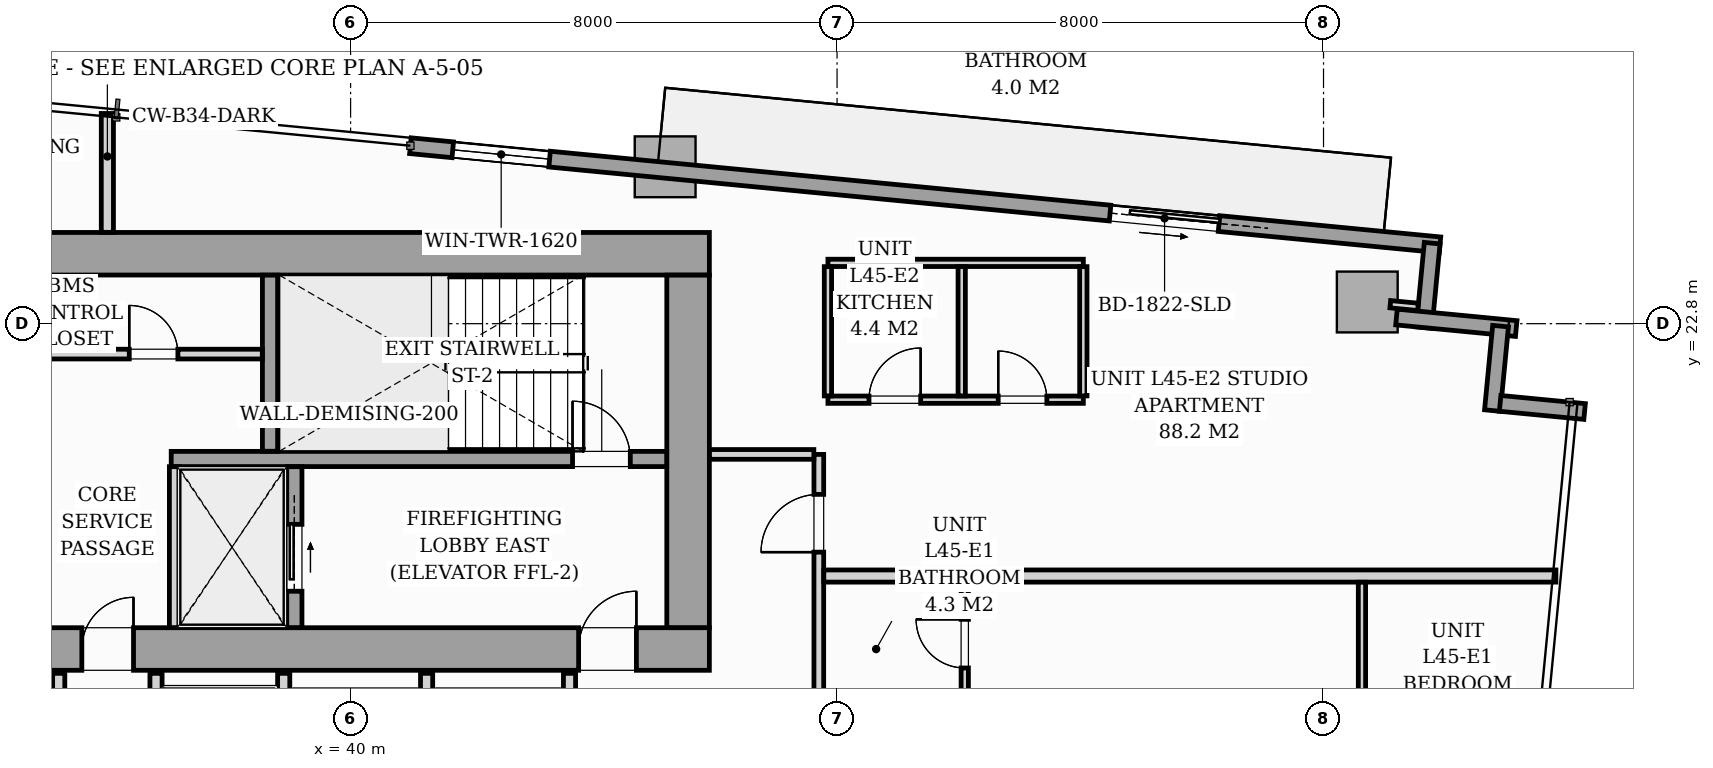
"""IFC4 building model, lengths in metres.
Left out: names, types, materials, properties, quantities, classifications, styles, units other than length and angle.
Written with IfcOpenShell. Run it as: python <this file> out.ifc"""

import sys

from ifc_helpers import new_model, si_unit, direction, frame, frame_2d, origin, origin_2d, place, context, subcontext, project, spatial, rectangle, i_section, extrude, source, transform, mapped, element, fill, save


model = new_model("IFC4")
c1 = context("Model", 3, precision=1e-05, world=origin(), true_north=direction((0.0, 1.0)))
c2 = subcontext(c1, "Body", "Model", "MODEL_VIEW")
j1 = project(units=[si_unit("LENGTHUNIT", "METRE"), si_unit("PLANEANGLEUNIT", "RADIAN")], contexts=[c1])
p1 = place(None, origin())
s1 = spatial("IfcSite", under=j1, at=p1, CompositionType="ELEMENT")
p2 = place(p1, origin())
s2 = spatial("IfcBuilding", under=s1, at=p2, CompositionType="ELEMENT")
p3 = place(p2, frame((0.0, 0.0, 156.6)))
s3 = spatial("IfcBuildingStorey", under=s2, at=p3, CompositionType="ELEMENT", Elevation=156.6)
m1 = source(origin(), c2, "Body", "SweptSolid", [
    extrude(i_section(OverallWidth=0.421, OverallDepth=0.465, WebThickness=0.045, FlangeThickness=0.073, FilletRadius=0.018, at=origin_2d()), origin(), (0.0, 0.0, 1.0), 3.196),
])
for number, where, z_axis, x_axis in (
    (1, (38.88, 17.4, 0.002), (0.0, 0.0, 1.0), (1.0, 0.0, 0.0)),
    (2, (45.6, 17.4, 0.002), (0.0, 0.0, 1.0), (1.0, 0.0, 0.0)),
    (3, (38.88, 24.0, 0.002), (0.0, 0.0, 1.0), (1.0, 0.0, 0.0)),
    (4, (45.6, 24.0, 0.002), (0.0, 0.0, 1.0), (1.0, 0.0, 0.0)),
):
    element("IfcColumn", number, at=place(p3, frame(where, z_axis=z_axis, x_axis=x_axis)), inside=s3, PredefinedType="PILASTER", context=c2, shape_type="MappedRepresentation", body=[
        mapped(m1, transform((0.0, 0.0, 0.0), scale=1.0)),
    ])
m2 = source(origin(), c2, "Body", "SweptSolid", [
    extrude(rectangle(XDim=1.0, YDim=1.0, at=origin_2d()), origin(), (0.0, 0.0, 1.0), 3.196),
])
for number, where, z_axis, x_axis in (
    (5, (45.173, 25.38, 0.002), (0.0, 0.0, 1.0), (0.995, -0.096, 0.0)),
    (6, (56.719, 23.157, 0.002), (0.0, 0.0, 1.0), (0.995, -0.096, 0.0)),
):
    element("IfcColumn", number, at=place(p3, frame(where, z_axis=z_axis, x_axis=x_axis)), inside=s3, PredefinedType="COLUMN", context=c2, shape_type="MappedRepresentation", body=[
        mapped(m2, transform((0.0, 0.0, 0.0), scale=1.0)),
    ])
p4 = place(p3, frame((40.983, 25.727, 0.0), z_axis=(0.0, 0.0, 1.0), x_axis=(0.995395844771, -0.095849424686, 0.0)))
e7 = element("IfcWall", 7, at=p4, inside=s3, PredefinedType="STANDARD", context=c2, shape_type="SweptSolid", body=[
    extrude(rectangle(XDim=17.01, YDim=0.26, at=frame_2d((8.505, 0.0))), origin(), (0.0, 0.0, 1.0), 2.94),
])
p5 = place(p4, frame((11.56, 0.0, 0.0)))
e8 = element("IfcOpeningElement", 8, at=p5, cuts=e7, PredefinedType="OPENING", context=c2, shape_type="SweptSolid", body=[
    extrude(rectangle(XDim=1.8, YDim=2.06, at=frame_2d((0.9, 1.03))), frame((0.0, 0.14, 0.0), z_axis=(0.0, -1.0, 0.0), x_axis=(1.0, 0.0, 0.0)), (0.0, 0.0, 1.0), 0.28),
])
p6 = place(p4, frame((0.7, 0.0, 0.65)))
e9 = element("IfcOpeningElement", 9, at=p6, cuts=e7, PredefinedType="OPENING", context=c2, shape_type="SweptSolid", body=[
    extrude(rectangle(XDim=1.6, YDim=1.5, at=frame_2d((0.8, 0.75))), frame((0.0, 0.14, 0.0), z_axis=(0.0, -1.0, 0.0), x_axis=(1.0, 0.0, 0.0)), (0.0, 0.0, 1.0), 0.28),
])
p7 = place(p3, frame((57.787, 24.124, 0.0), z_axis=(0.0, 0.0, 1.0), x_axis=(-0.095915846097, -0.995389446633, 0.0)))
e10 = element("IfcWall", 10, at=p7, inside=s3, PredefinedType="STANDARD", context=c2, shape_type="SweptSolid", body=[
    extrude(rectangle(XDim=1.395, YDim=0.26, at=frame_2d((0.697, 0.0))), origin(), (0.0, 0.0, 1.0), 2.94),
])
p8 = place(p3, frame((57.2, 22.909, 0.0), z_axis=(0.0, 0.0, 1.0), x_axis=(0.995401789159, -0.095787672171, 0.0)))
e11 = element("IfcWall", 11, at=p8, inside=s3, PredefinedType="STANDARD", context=c2, shape_type="SweptSolid", body=[
    extrude(rectangle(XDim=1.978, YDim=0.26, at=frame_2d((0.989, 0.0))), origin(), (0.0, 0.0, 1.0), 2.94),
])
for number, where, z_axis, x_axis in (
    (12, (58.912, 22.76, 0.0), (0.0, 0.0, 1.0), (-0.096, -0.995, 0.0)),
    (13, (58.905, 21.49, 0.0), (0.0, 0.0, 1.0), (0.995, -0.096, 0.0)),
):
    element("IfcWall", number, at=place(p3, frame(where, z_axis=z_axis, x_axis=x_axis)), inside=s3, PredefinedType="STANDARD", context=c2, shape_type="SweptSolid", body=[
        extrude(rectangle(XDim=1.395, YDim=0.26, at=frame_2d((0.698, 0.0))), origin(), (0.0, 0.0, 1.0), 2.94),
    ])
p9 = place(p3, frame((26.1, 17.45, 0.0), z_axis=(0.0, 0.0, 1.0), x_axis=(1.0, 0.0, 0.0)))
e14 = element("IfcWall", 14, at=p9, inside=s3, PredefinedType="SHEAR", context=c2, shape_type="SweptSolid", body=[
    extrude(rectangle(XDim=19.8, YDim=0.7, at=frame_2d((9.9, 0.0))), origin(), (0.0, 0.0, 1.0), 3.2),
])
p10 = place(p9, frame((1.05, 0.0, 0.0)))
e15 = element("IfcOpeningElement", 15, at=p10, cuts=e14, PredefinedType="OPENING", context=c2, shape_type="SweptSolid", body=[
    extrude(rectangle(XDim=0.95, YDim=2.06, at=frame_2d((0.475, 1.03))), frame((0.0, 0.36, 0.0), z_axis=(0.0, -1.0, 0.0), x_axis=(1.0, 0.0, 0.0)), (0.0, 0.0, 1.0), 0.72),
])
p11 = place(p9, frame((9.48, 0.0, 0.0)))
e16 = element("IfcOpeningElement", 16, at=p11, cuts=e14, PredefinedType="OPENING", context=c2, shape_type="SweptSolid", body=[
    extrude(rectangle(XDim=0.85, YDim=2.0, at=frame_2d((0.425, 1.0))), frame((0.0, 0.36, 0.0), z_axis=(0.0, -1.0, 0.0), x_axis=(1.0, 0.0, 0.0)), (0.0, 0.0, 1.0), 0.72),
])
p12 = place(p9, frame((17.65, 0.0, 0.0)))
e17 = element("IfcOpeningElement", 17, at=p12, cuts=e14, PredefinedType="OPENING", context=c2, shape_type="SweptSolid", body=[
    extrude(rectangle(XDim=0.95, YDim=2.06, at=frame_2d((0.475, 1.03))), frame((0.0, 0.36, 0.0), z_axis=(0.0, -1.0, 0.0), x_axis=(1.0, 0.0, 0.0)), (0.0, 0.0, 1.0), 0.72),
])
p13 = place(p3, frame((26.1, 23.95, 0.0), z_axis=(0.0, 0.0, 1.0), x_axis=(1.0, 0.0, 0.0)))
e18 = element("IfcWall", 18, at=p13, inside=s3, PredefinedType="SHEAR", context=c2, shape_type="SweptSolid", body=[
    extrude(rectangle(XDim=19.8, YDim=0.7, at=frame_2d((9.9, 0.0))), origin(), (0.0, 0.0, 1.0), 3.2),
])
p14 = place(p3, frame((45.55, 17.802, 0.0), z_axis=(0.0, 0.0, 1.0), x_axis=(0.0, 1.0, 0.0)))
e19 = element("IfcWall", 19, at=p14, inside=s3, PredefinedType="SHEAR", context=c2, shape_type="SweptSolid", body=[
    extrude(rectangle(XDim=5.796, YDim=0.7, at=frame_2d((2.898, 0.0))), origin(), (0.0, 0.0, 1.0), 3.2),
])
p15 = place(p3, frame((37.05, 20.575, 0.0), z_axis=(0.0, 0.0, 1.0), x_axis=(1.0, 0.0, 0.0)))
e20 = element("IfcWall", 20, at=p15, inside=s3, PredefinedType="SOLIDWALL", context=c2, shape_type="SweptSolid", body=[
    extrude(rectangle(XDim=8.148, YDim=0.25, at=frame_2d((4.074, 0.0))), origin(), (0.0, 0.0, 1.0), 3.2),
])
p16 = place(p15, frame((6.6, 0.0, 0.0)))
e21 = element("IfcOpeningElement", 21, at=p16, cuts=e20, PredefinedType="OPENING", context=c2, shape_type="SweptSolid", body=[
    extrude(rectangle(XDim=0.95, YDim=2.06, at=frame_2d((0.475, 1.03))), frame((0.0, 0.135, 0.0), z_axis=(0.0, -1.0, 0.0), x_axis=(1.0, 0.0, 0.0)), (0.0, 0.0, 1.0), 0.27),
])
p17 = place(p3, frame((38.675, 20.702, 0.0), z_axis=(0.0, 0.0, 1.0), x_axis=(0.0, 1.0, 0.0)))
e22 = element("IfcWall", 22, at=p17, inside=s3, PredefinedType="SOLIDWALL", context=c2, shape_type="SweptSolid", body=[
    extrude(rectangle(XDim=2.896, YDim=0.25, at=frame_2d((1.448, 0.0))), origin(), (0.0, 0.0, 1.0), 3.2),
])
p18 = place(p3, frame((37.1, 17.802, 0.0), z_axis=(0.0, 0.0, 1.0), x_axis=(0.0, 1.0, 0.0)))
e23 = element("IfcWall", 23, at=p18, inside=s3, PredefinedType="PARTITIONING", context=c2, shape_type="SweptSolid", body=[
    extrude(rectangle(XDim=2.646, YDim=0.16, at=frame_2d((1.323, 0.0))), origin(), (0.0, 0.0, 1.0), 2.94),
])
p19 = place(p3, frame((39.075, 17.802, 0.0), z_axis=(0.0, 0.0, 1.0), x_axis=(0.0, 1.0, 0.0)))
e24 = element("IfcWall", 24, at=p19, inside=s3, PredefinedType="SOLIDWALL", context=c2, shape_type="SweptSolid", body=[
    extrude(rectangle(XDim=2.646, YDim=0.25, at=frame_2d((1.323, 0.0))), origin(), (0.0, 0.0, 1.0), 3.2),
])
p20 = place(p19, frame((0.598, 0.0, 0.0)))
e25 = element("IfcOpeningElement", 25, at=p20, cuts=e24, PredefinedType="OPENING", context=c2, shape_type="SweptSolid", body=[
    extrude(rectangle(XDim=1.1, YDim=2.08, at=frame_2d((0.55, 1.04))), frame((0.0, 0.135, 0.0), z_axis=(0.0, -1.0, 0.0), x_axis=(1.0, 0.0, 0.0)), (0.0, 0.0, 1.0), 0.27),
])
p21 = place(p3, frame((34.982, 22.3, 0.0), z_axis=(0.0, 0.0, 1.0), x_axis=(1.0, 0.0, 0.0)))
e26 = element("IfcWall", 26, at=p21, inside=s3, PredefinedType="PARTITIONING", context=c2, shape_type="SweptSolid", body=[
    extrude(rectangle(XDim=3.566, YDim=0.16, at=frame_2d((1.783, 0.0))), origin(), (0.0, 0.0, 1.0), 2.94),
])
p22 = place(p21, frame((1.378, 0.0, 0.0)))
e27 = element("IfcOpeningElement", 27, at=p22, cuts=e26, PredefinedType="OPENING", context=c2, shape_type="SweptSolid", body=[
    extrude(rectangle(XDim=0.8, YDim=2.05, at=frame_2d((0.4, 1.025))), frame((0.0, 0.09, 0.0), z_axis=(0.0, -1.0, 0.0), x_axis=(1.0, 0.0, 0.0)), (0.0, 0.0, 1.0), 0.18),
])
for number, where, z_axis, x_axis in (
    (28, (35.2, 14.75, 0.0), (0.0, 0.0, 1.0), (0.0, 1.0, 0.0)),
    (29, (36.8, 14.75, 0.0), (0.0, 0.0, 1.0), (0.0, 1.0, 0.0)),
    (30, (38.9, 14.75, 0.0), (0.0, 0.0, 1.0), (0.0, 1.0, 0.0)),
    (31, (41.25, 14.75, 0.0), (0.0, 0.0, 1.0), (0.0, 1.0, 0.0)),
    (32, (43.6, 14.75, 0.0), (0.0, 0.0, 1.0), (0.0, 1.0, 0.0)),
):
    element("IfcWall", number, at=place(p3, frame(where, z_axis=z_axis, x_axis=x_axis)), inside=s3, PredefinedType="PARTITIONING", context=c2, shape_type="SweptSolid", body=[
        extrude(rectangle(XDim=2.3, YDim=0.2, at=frame_2d((1.15, 0.0))), origin(), (0.0, 0.0, 1.0), 2.94),
    ])
p23 = place(p3, frame((47.7, 12.732, 0.0), z_axis=(0.0, 0.0, 1.0), x_axis=(0.0, 1.0, 0.0)))
e33 = element("IfcWall", 33, at=p23, inside=s3, PredefinedType="PARTITIONING", context=c2, shape_type="SweptSolid", body=[
    extrude(rectangle(XDim=7.918, YDim=0.16, at=frame_2d((3.959, 0.0))), origin(), (0.0, 0.0, 1.0), 2.94),
])
p24 = place(p23, frame((0.493, 0.0, 0.0)))
e34 = element("IfcOpeningElement", 34, at=p24, cuts=e33, PredefinedType="OPENING", context=c2, shape_type="SweptSolid", body=[
    extrude(rectangle(XDim=0.95, YDim=2.06, at=frame_2d((0.475, 1.03))), frame((0.0, 0.09, 0.0), z_axis=(0.0, -1.0, 0.0), x_axis=(1.0, 0.0, 0.0)), (0.0, 0.0, 1.0), 0.18),
])
p25 = place(p23, frame((6.311, 0.0, 0.0)))
e35 = element("IfcOpeningElement", 35, at=p25, cuts=e33, PredefinedType="OPENING", context=c2, shape_type="SweptSolid", body=[
    extrude(rectangle(XDim=0.95, YDim=2.06, at=frame_2d((0.475, 1.03))), frame((0.0, 0.09, 0.0), z_axis=(0.0, -1.0, 0.0), x_axis=(1.0, 0.0, 0.0)), (0.0, 0.0, 1.0), 0.18),
])
p26 = place(p3, frame((36.0, 24.302, 0.0), z_axis=(0.0, 0.0, 1.0), x_axis=(0.0, 1.0, 0.0)))
e36 = element("IfcWall", 36, at=p26, inside=s3, PredefinedType="PARTITIONING", context=c2, shape_type="SweptSolid", body=[
    extrude(rectangle(XDim=1.955, YDim=0.2, at=frame_2d((0.978, 0.0))), origin(), (0.0, 0.0, 1.0), 2.94),
])
p27 = place(p3, frame((45.902, 20.65, 0.0), z_axis=(0.0, 0.0, 1.0), x_axis=(1.0, 0.0, 0.0)))
e37 = element("IfcWall", 37, at=p27, inside=s3, PredefinedType="PARTITIONING", context=c2, shape_type="SweptSolid", body=[
    extrude(rectangle(XDim=1.716, YDim=0.16, at=frame_2d((0.858, 0.0))), origin(), (0.0, 0.0, 1.0), 2.94),
])
p28 = place(p3, frame((47.782, 18.65, 0.0), z_axis=(0.0, 0.0, 1.0), x_axis=(1.0, 0.0, 0.0)))
e38 = element("IfcWall", 38, at=p28, inside=s3, PredefinedType="PARTITIONING", context=c2, shape_type="SweptSolid", body=[
    extrude(rectangle(XDim=12.04, YDim=0.2, at=frame_2d((6.02, 0.0))), origin(), (0.0, 0.0, 1.0), 2.94),
])
p29 = place(p3, frame((50.1, 14.5, 0.0), z_axis=(0.0, 0.0, 1.0), x_axis=(0.0, 1.0, 0.0)))
e39 = element("IfcWall", 39, at=p29, inside=s3, PredefinedType="PARTITIONING", context=c2, shape_type="SweptSolid", body=[
    extrude(rectangle(XDim=4.048, YDim=0.12, at=frame_2d((2.024, 0.0))), origin(), (0.0, 0.0, 1.0), 2.94),
])
p30 = place(p29, frame((0.587, 0.0, 0.0)))
e40 = element("IfcOpeningElement", 40, at=p30, cuts=e39, PredefinedType="OPENING", context=c2, shape_type="SweptSolid", body=[
    extrude(rectangle(XDim=0.85, YDim=2.05, at=frame_2d((0.425, 1.025))), frame((0.0, 0.07, 0.0), z_axis=(0.0, -1.0, 0.0), x_axis=(1.0, 0.0, 0.0)), (0.0, 0.0, 1.0), 0.14),
])
p31 = place(p29, frame((2.638, 0.0, 0.0)))
e41 = element("IfcOpeningElement", 41, at=p31, cuts=e39, PredefinedType="OPENING", context=c2, shape_type="SweptSolid", body=[
    extrude(rectangle(XDim=0.8, YDim=2.02, at=frame_2d((0.4, 1.01))), frame((0.0, 0.07, 0.0), z_axis=(0.0, -1.0, 0.0), x_axis=(1.0, 0.0, 0.0)), (0.0, 0.0, 1.0), 0.14),
])
p32 = place(p3, frame((56.632, 6.179, 0.0), z_axis=(0.0, 0.0, 1.0), x_axis=(0.0, 1.0, 0.0)))
e42 = element("IfcWall", 42, at=p32, inside=s3, PredefinedType="PARTITIONING", context=c2, shape_type="SweptSolid", body=[
    extrude(rectangle(XDim=12.369, YDim=0.12, at=frame_2d((6.185, 0.0))), origin(), (0.0, 0.0, 1.0), 2.94),
])
p33 = place(p32, frame((5.624, 0.0, 0.0)))
e43 = element("IfcOpeningElement", 43, at=p33, cuts=e42, PredefinedType="OPENING", context=c2, shape_type="SweptSolid", body=[
    extrude(rectangle(XDim=0.85, YDim=2.05, at=frame_2d((0.425, 1.025))), frame((0.0, 0.07, 0.0), z_axis=(0.0, -1.0, 0.0), x_axis=(1.0, 0.0, 0.0)), (0.0, 0.0, 1.0), 0.14),
])
p34 = place(p3, frame((47.85, 21.55, 0.0), z_axis=(0.0, 0.0, 1.0), x_axis=(1.0, 0.0, 0.0)))
e44 = element("IfcWall", 44, at=p34, inside=s3, PredefinedType="PARTITIONING", context=c2, shape_type="SweptSolid", body=[
    extrude(rectangle(XDim=4.2, YDim=0.12, at=frame_2d((2.1, 0.0))), origin(), (0.0, 0.0, 1.0), 2.94),
])
p35 = place(p34, frame((0.675, 0.0, 0.0)))
e45 = element("IfcOpeningElement", 45, at=p35, cuts=e44, PredefinedType="OPENING", context=c2, shape_type="SweptSolid", body=[
    extrude(rectangle(XDim=0.85, YDim=2.05, at=frame_2d((0.425, 1.025))), frame((0.0, 0.07, 0.0), z_axis=(0.0, -1.0, 0.0), x_axis=(1.0, 0.0, 0.0)), (0.0, 0.0, 1.0), 0.14),
])
p36 = place(p34, frame((2.8, 0.0, 0.0)))
e46 = element("IfcOpeningElement", 46, at=p36, cuts=e44, PredefinedType="OPENING", context=c2, shape_type="SweptSolid", body=[
    extrude(rectangle(XDim=0.8, YDim=2.02, at=frame_2d((0.4, 1.01))), frame((0.0, 0.07, 0.0), z_axis=(0.0, -1.0, 0.0), x_axis=(1.0, 0.0, 0.0)), (0.0, 0.0, 1.0), 0.14),
])
p37 = place(p3, frame((47.85, 23.8, 0.0), z_axis=(0.0, 0.0, 1.0), x_axis=(1.0, 0.0, 0.0)))
e47 = element("IfcWall", 47, at=p37, inside=s3, PredefinedType="PARTITIONING", context=c2, shape_type="SweptSolid", body=[
    extrude(rectangle(XDim=4.2, YDim=0.12, at=frame_2d((2.1, 0.0))), origin(), (0.0, 0.0, 1.0), 2.216),
])
for number, where, z_axis, x_axis in (
    (48, (47.85, 21.612, 0.0), (0.0, 0.0, 1.0), (0.0, 1.0, 0.0)),
    (49, (50.05, 21.612, 0.0), (0.0, 0.0, 1.0), (0.0, 1.0, 0.0)),
    (50, (52.05, 21.612, 0.0), (0.0, 0.0, 1.0), (0.0, 1.0, 0.0)),
):
    element("IfcWall", number, at=place(p3, frame(where, z_axis=z_axis, x_axis=x_axis)), inside=s3, PredefinedType="PARTITIONING", context=c2, shape_type="SweptSolid", body=[
        extrude(rectangle(XDim=2.126, YDim=0.12, at=frame_2d((1.063, 0.0))), origin(), (0.0, 0.0, 1.0), 2.94),
    ])
p38 = place(p3, frame((57.098, 23.12, 0.0), z_axis=(0.0, 0.0, 1.0), x_axis=(0.995384576284, -0.09596637586, 0.0)))
e51 = element("IfcWall", 51, at=p38, inside=s3, PredefinedType="PARTITIONING", context=c2, shape_type="SweptSolid", body=[
    extrude(rectangle(XDim=0.458, YDim=0.12, at=frame_2d((0.229, 0.0))), origin(), (0.0, 0.0, 1.0), 2.94),
])
m3 = source(origin(), c2, "Body", "SweptSolid", [
    extrude(rectangle(XDim=1.8, YDim=2.06, at=frame_2d((0.9, 1.03))), frame((0.0, 0.025, 0.0), z_axis=(0.0, -1.0, 0.0), x_axis=(1.0, 0.0, 0.0)), (0.0, 0.0, 1.0), 0.05),
])
p39 = place(p5, origin())
e52 = element("IfcDoor", 52, at=p39, inside=s3, OperationType="SLIDING_TO_RIGHT", PredefinedType="DOOR", context=c2, shape_type="MappedRepresentation", body=[
    mapped(m3, transform((0.0, 0.0, 0.0), scale=1.0)),
])
fill(e8, e52)
m4 = source(origin(), c2, "Body", "SweptSolid", [
    extrude(rectangle(XDim=1.6, YDim=1.5, at=frame_2d((0.8, 0.75))), frame((0.0, 0.03, 0.0), z_axis=(0.0, -1.0, 0.0), x_axis=(1.0, 0.0, 0.0)), (0.0, 0.0, 1.0), 0.06),
])
p40 = place(p6, origin())
e53 = element("IfcWindow", 53, at=p40, inside=s3, PartitioningType="SINGLE_PANEL", PredefinedType="WINDOW", context=c2, shape_type="MappedRepresentation", body=[
    mapped(m4, transform((0.0, 0.0, 0.0), scale=1.0)),
])
fill(e9, e53)
m5 = source(origin(), c2, "Body", "SweptSolid", [
    extrude(rectangle(XDim=0.85, YDim=2.0, at=frame_2d((0.425, 1.0))), frame((0.0, 0.025, 0.0), z_axis=(0.0, -1.0, 0.0), x_axis=(1.0, 0.0, 0.0)), (0.0, 0.0, 1.0), 0.05),
])
p41 = place(p11, origin())
e54 = element("IfcDoor", 54, at=p41, inside=s3, OperationType="SINGLE_SWING_RIGHT", PredefinedType="DOOR", context=c2, shape_type="MappedRepresentation", body=[
    mapped(m5, transform((0.0, 0.0, 0.0), scale=1.0)),
])
fill(e16, e54)
m6 = source(origin(), c2, "Body", "SweptSolid", [
    extrude(rectangle(XDim=0.95, YDim=2.06, at=frame_2d((0.475, 1.03))), frame((0.0, 0.025, 0.0), z_axis=(0.0, -1.0, 0.0), x_axis=(1.0, 0.0, 0.0)), (0.0, 0.0, 1.0), 0.05),
])
p42 = place(p12, origin())
e55 = element("IfcDoor", 55, at=p42, inside=s3, OperationType="SINGLE_SWING_RIGHT", PredefinedType="DOOR", context=c2, shape_type="MappedRepresentation", body=[
    mapped(m6, transform((0.0, 0.0, 0.0), scale=1.0)),
])
fill(e17, e55)
p43 = place(p16, origin())
e56 = element("IfcDoor", 56, at=p43, inside=s3, OperationType="SINGLE_SWING_LEFT", PredefinedType="DOOR", context=c2, shape_type="MappedRepresentation", body=[
    mapped(m6, transform((0.0, 0.0, 0.0), scale=1.0)),
])
fill(e21, e56)
m7 = source(origin(), c2, "Body", "SweptSolid", [
    extrude(rectangle(XDim=1.1, YDim=2.08, at=frame_2d((0.55, 1.04))), frame((0.0, 0.025, 0.0), z_axis=(0.0, -1.0, 0.0), x_axis=(1.0, 0.0, 0.0)), (0.0, 0.0, 1.0), 0.05),
])
p44 = place(p20, origin())
e57 = element("IfcDoor", 57, at=p44, inside=s3, OperationType="SLIDING_TO_RIGHT", PredefinedType="DOOR", context=c2, shape_type="MappedRepresentation", body=[
    mapped(m7, transform((0.0, 0.0, 0.0), scale=1.0)),
])
fill(e25, e57)
m8 = source(origin(), c2, "Body", "SweptSolid", [
    extrude(rectangle(XDim=0.8, YDim=2.05, at=frame_2d((0.4, 1.025))), frame((0.0, 0.025, 0.0), z_axis=(0.0, -1.0, 0.0), x_axis=(1.0, 0.0, 0.0)), (0.0, 0.0, 1.0), 0.05),
])
p45 = place(p22, origin())
e58 = element("IfcDoor", 58, at=p45, inside=s3, OperationType="SINGLE_SWING_LEFT", PredefinedType="DOOR", context=c2, shape_type="MappedRepresentation", body=[
    mapped(m8, transform((0.0, 0.0, 0.0), scale=1.0)),
])
fill(e27, e58)
m9 = source(origin(), c2, "Body", "SweptSolid", [
    extrude(rectangle(XDim=0.8, YDim=2.02, at=frame_2d((0.4, 1.01))), frame((0.0, 0.025, 0.0), z_axis=(0.0, -1.0, 0.0), x_axis=(1.0, 0.0, 0.0)), (0.0, 0.0, 1.0), 0.05),
])
p46 = place(p31, origin())
e59 = element("IfcDoor", 59, at=p46, inside=s3, OperationType="SINGLE_SWING_RIGHT", PredefinedType="DOOR", context=c2, shape_type="MappedRepresentation", body=[
    mapped(m9, transform((0.0, 0.0, 0.0), scale=1.0)),
])
fill(e41, e59)
m10 = source(origin(), c2, "Body", "SweptSolid", [
    extrude(rectangle(XDim=0.95, YDim=2.06, at=frame_2d((0.475, 1.03))), frame((0.0, 0.025, 0.0), z_axis=(0.0, -1.0, 0.0), x_axis=(1.0, 0.0, 0.0)), (0.0, 0.0, 1.0), 0.05),
])
p47 = place(p25, origin())
e60 = element("IfcDoor", 60, at=p47, inside=s3, OperationType="SINGLE_SWING_LEFT", PredefinedType="DOOR", context=c2, shape_type="MappedRepresentation", body=[
    mapped(m10, transform((0.0, 0.0, 0.0), scale=1.0)),
])
fill(e35, e60)
m11 = source(origin(), c2, "Body", "SweptSolid", [
    extrude(rectangle(XDim=0.85, YDim=2.05, at=frame_2d((0.425, 1.025))), frame((0.0, 0.025, 0.0), z_axis=(0.0, -1.0, 0.0), x_axis=(1.0, 0.0, 0.0)), (0.0, 0.0, 1.0), 0.05),
])
p48 = place(p35, origin())
e61 = element("IfcDoor", 61, at=p48, inside=s3, OperationType="SINGLE_SWING_RIGHT", PredefinedType="DOOR", context=c2, shape_type="MappedRepresentation", body=[
    mapped(m11, transform((0.0, 0.0, 0.0), scale=1.0)),
])
fill(e45, e61)
p49 = place(p36, origin())
e62 = element("IfcDoor", 62, at=p49, inside=s3, OperationType="SINGLE_SWING_LEFT", PredefinedType="DOOR", context=c2, shape_type="MappedRepresentation", body=[
    mapped(m9, transform((0.0, 0.0, 0.0), scale=1.0)),
])
fill(e46, e62)
save(model, sys.argv[1])
